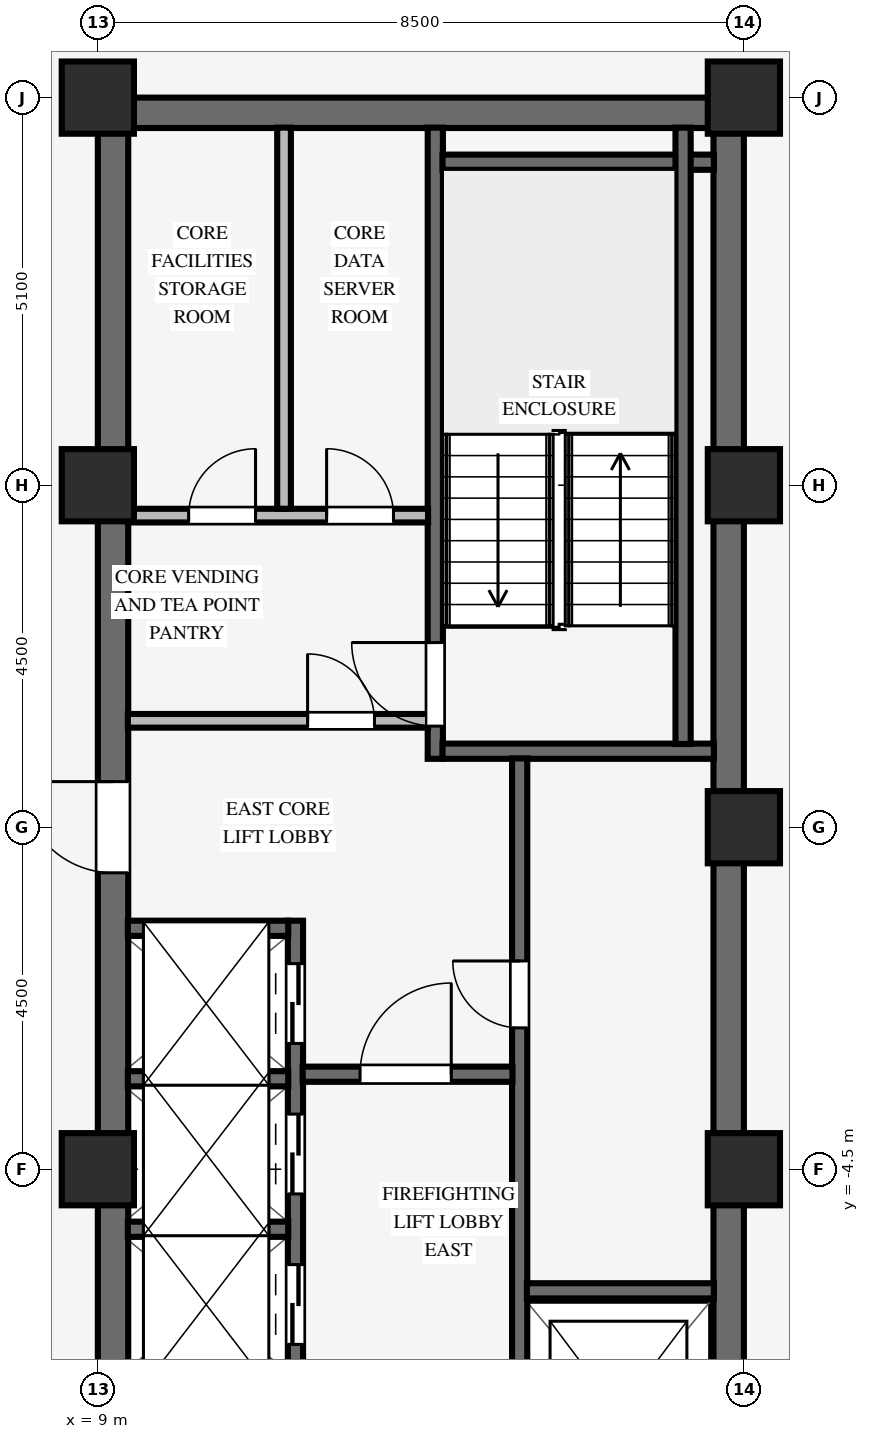
"""IFC4 building model, lengths in metres.
Left out: names, types, materials, properties, quantities, classifications, styles, units other than length and angle.
Written with IfcOpenShell. Run it as: python <this file> out.ifc"""

import sys

from ifc_helpers import new_model, si_unit, direction, frame, frame_2d, origin, origin_2d, place, context, subcontext, project, spatial, rectangle, extrude, source, transform, mapped, element, fill, save


model = new_model("IFC4")
c1 = context("Model", 3, precision=1e-05, world=origin(), true_north=direction((0.0, 1.0)))
c2 = subcontext(c1, "Body", "Model", "MODEL_VIEW")
j1 = project(units=[si_unit("LENGTHUNIT", "METRE"), si_unit("PLANEANGLEUNIT", "RADIAN")], contexts=[c1])
p1 = place(None, origin())
s1 = spatial("IfcSite", under=j1, at=p1, CompositionType="ELEMENT")
p2 = place(p1, origin())
s2 = spatial("IfcBuilding", under=s1, at=p2, CompositionType="ELEMENT")
p3 = place(p2, frame((0.0, 0.0, 156.7)))
s3 = spatial("IfcBuildingStorey", under=s2, at=p3, CompositionType="ELEMENT", Elevation=156.7)
p4 = place(p3, frame((9.0, 9.4, 0.0), z_axis=(0.0, 0.0, 1.0), x_axis=(1.0, 0.0, 0.0)))
e1 = element("IfcWall", 1, at=p4, inside=s3, PredefinedType="SHEAR", context=c2, shape_type="SweptSolid", body=[
    extrude(rectangle(XDim=8.5, YDim=0.4, at=frame_2d((4.25, 0.0))), origin(), (0.0, 0.0, 1.0), 3.37),
])
p5 = place(p3, frame((9.2, -9.205, 0.0), z_axis=(0.0, 0.0, 1.0), x_axis=(0.0, 1.0, 0.0)))
e2 = element("IfcWall", 2, at=p5, inside=s3, PredefinedType="SHEAR", context=c2, shape_type="SweptSolid", body=[
    extrude(rectangle(XDim=18.41, YDim=0.4, at=frame_2d((9.205, 0.0))), origin(), (0.0, 0.0, 1.0), 3.37),
])
p6 = place(p5, frame((8.605, 0.0, 0.0)))
e3 = element("IfcOpeningElement", 3, at=p6, cuts=e2, PredefinedType="OPENING", context=c2, shape_type="SweptSolid", body=[
    extrude(rectangle(XDim=1.2, YDim=2.15, at=frame_2d((0.6, 1.075))), frame((0.0, 0.21, 0.0), z_axis=(0.0, -1.0, 0.0), x_axis=(1.0, 0.0, 0.0)), (0.0, 0.0, 1.0), 0.42),
])
p7 = place(p3, frame((17.3, -9.205, 0.0), z_axis=(0.0, 0.0, 1.0), x_axis=(0.0, 1.0, 0.0)))
e4 = element("IfcWall", 4, at=p7, inside=s3, PredefinedType="SHEAR", context=c2, shape_type="SweptSolid", body=[
    extrude(rectangle(XDim=18.41, YDim=0.4, at=frame_2d((9.205, 0.0))), origin(), (0.0, 0.0, 1.0), 3.37),
])
for number, where, z_axis, x_axis in (
    (5, (9.0, -4.5, 0.0), (0.0, 0.0, 1.0), (1.0, 0.0, 0.0)),
    (6, (9.0, 4.5, 0.0), (0.0, 0.0, 1.0), (1.0, 0.0, 0.0)),
    (7, (9.0, 9.6, 0.0), (0.0, 0.0, 1.0), (1.0, 0.0, 0.0)),
    (8, (17.5, -4.5, 0.0), (0.0, 0.0, 1.0), (1.0, 0.0, 0.0)),
    (9, (17.5, 4.5, 0.0), (0.0, 0.0, 1.0), (1.0, 0.0, 0.0)),
    (10, (17.5, 9.6, 0.0), (0.0, 0.0, 1.0), (1.0, 0.0, 0.0)),
    (11, (17.5, 0.0, 0.0), (0.0, 0.0, 1.0), (1.0, 0.0, 0.0)),
):
    element("IfcColumn", number, at=place(p3, frame(where, z_axis=z_axis, x_axis=x_axis)), inside=s3, PredefinedType="COLUMN", context=c2, shape_type="SweptSolid", body=[
        extrude(rectangle(XDim=0.95, YDim=0.95, at=origin_2d()), origin(), (0.0, 0.0, 1.0), 3.37),
    ])
p8 = place(p3, frame((13.44, 0.9, 0.0), z_axis=(0.0, 0.0, 1.0), x_axis=(0.0, 1.0, 0.0)))
e12 = element("IfcWall", 12, at=p8, inside=s3, PredefinedType="SHEAR", context=c2, shape_type="SweptSolid", body=[
    extrude(rectangle(XDim=8.305, YDim=0.2, at=frame_2d((4.153, 0.0))), origin(), (0.0, 0.0, 1.0), 3.37),
])
p9 = place(p8, frame((0.43, 0.0, 0.0)))
e13 = element("IfcOpeningElement", 13, at=p9, cuts=e12, PredefinedType="OPENING", context=c2, shape_type="SweptSolid", body=[
    extrude(rectangle(XDim=1.1, YDim=2.15, at=frame_2d((0.55, 1.075))), frame((0.0, 0.11, 0.0), z_axis=(0.0, -1.0, 0.0), x_axis=(1.0, 0.0, 0.0)), (0.0, 0.0, 1.0), 0.22),
])
for number, where, z_axis, x_axis in (
    (14, (13.535, 1.0, 0.0), (0.0, 0.0, 1.0), (1.0, 0.0, 0.0)),
    (15, (13.535, 8.75, 0.0), (0.0, 0.0, 1.0), (1.0, 0.0, 0.0)),
):
    element("IfcWall", number, at=place(p3, frame(where, z_axis=z_axis, x_axis=x_axis)), inside=s3, PredefinedType="SHEAR", context=c2, shape_type="SweptSolid", body=[
        extrude(rectangle(XDim=3.57, YDim=0.2, at=frame_2d((1.785, 0.0))), origin(), (0.0, 0.0, 1.0), 3.37),
    ])
p10 = place(p3, frame((16.7, 1.095, 0.0), z_axis=(0.0, 0.0, 1.0), x_axis=(0.0, 1.0, 0.0)))
e16 = element("IfcWall", 16, at=p10, inside=s3, PredefinedType="SHEAR", context=c2, shape_type="SweptSolid", body=[
    extrude(rectangle(XDim=8.11, YDim=0.2, at=frame_2d((4.055, 0.0))), origin(), (0.0, 0.0, 1.0), 3.37),
])
p11 = place(p3, frame((14.55, -9.205, 0.0), z_axis=(0.0, 0.0, 1.0), x_axis=(0.0, 1.0, 0.0)))
e17 = element("IfcWall", 17, at=p11, inside=s3, PredefinedType="SHEAR", context=c2, shape_type="SweptSolid", body=[
    extrude(rectangle(XDim=10.11, YDim=0.2, at=frame_2d((5.055, 0.0))), origin(), (0.0, 0.0, 1.0), 3.37),
])
p12 = place(p11, frame((6.565, 0.0, 0.0)))
e18 = element("IfcOpeningElement", 18, at=p12, cuts=e17, PredefinedType="OPENING", context=c2, shape_type="SweptSolid", body=[
    extrude(rectangle(XDim=0.88, YDim=2.1, at=frame_2d((0.44, 1.05))), frame((0.0, 0.11, 0.0), z_axis=(0.0, -1.0, 0.0), x_axis=(1.0, 0.0, 0.0)), (0.0, 0.0, 1.0), 0.22),
])
p13 = place(p11, frame((0.93, 0.0, 0.0)))
e19 = element("IfcOpeningElement", 19, at=p13, cuts=e17, PredefinedType="OPENING", context=c2, shape_type="SweptSolid", body=[
    extrude(rectangle(XDim=1.15, YDim=2.15, at=frame_2d((0.575, 1.075))), frame((0.0, 0.11, 0.0), z_axis=(0.0, -1.0, 0.0), x_axis=(1.0, 0.0, 0.0)), (0.0, 0.0, 1.0), 0.22),
])
p14 = place(p3, frame((14.645, -6.1, 0.0), z_axis=(0.0, 0.0, 1.0), x_axis=(1.0, 0.0, 0.0)))
e20 = element("IfcWall", 20, at=p14, inside=s3, PredefinedType="SHEAR", context=c2, shape_type="SweptSolid", body=[
    extrude(rectangle(XDim=2.46, YDim=0.2, at=frame_2d((1.23, 0.0))), origin(), (0.0, 0.0, 1.0), 3.37),
])
p15 = place(p3, frame((11.6, -9.205, 0.0), z_axis=(0.0, 0.0, 1.0), x_axis=(0.0, 1.0, 0.0)))
e21 = element("IfcWall", 21, at=p15, inside=s3, PredefinedType="SHEAR", context=c2, shape_type="SweptSolid", body=[
    extrude(rectangle(XDim=7.975, YDim=0.2, at=frame_2d((3.988, 0.0))), origin(), (0.0, 0.0, 1.0), 3.37),
])
p16 = place(p15, frame((0.42, 0.0, 0.0)))
e22 = element("IfcOpeningElement", 22, at=p16, cuts=e21, PredefinedType="OPENING", context=c2, shape_type="SweptSolid", body=[
    extrude(rectangle(XDim=1.05, YDim=2.15, at=frame_2d((0.525, 1.075))), frame((0.0, 0.11, 0.0), z_axis=(0.0, -1.0, 0.0), x_axis=(1.0, 0.0, 0.0)), (0.0, 0.0, 1.0), 0.22),
])
p17 = place(p15, frame((2.4, 0.0, 0.0)))
e23 = element("IfcOpeningElement", 23, at=p17, cuts=e21, PredefinedType="OPENING", context=c2, shape_type="SweptSolid", body=[
    extrude(rectangle(XDim=1.05, YDim=2.15, at=frame_2d((0.525, 1.075))), frame((0.0, 0.11, 0.0), z_axis=(0.0, -1.0, 0.0), x_axis=(1.0, 0.0, 0.0)), (0.0, 0.0, 1.0), 0.22),
])
p18 = place(p15, frame((4.38, 0.0, 0.0)))
e24 = element("IfcOpeningElement", 24, at=p18, cuts=e21, PredefinedType="OPENING", context=c2, shape_type="SweptSolid", body=[
    extrude(rectangle(XDim=1.05, YDim=2.15, at=frame_2d((0.525, 1.075))), frame((0.0, 0.11, 0.0), z_axis=(0.0, -1.0, 0.0), x_axis=(1.0, 0.0, 0.0)), (0.0, 0.0, 1.0), 0.22),
])
p19 = place(p15, frame((6.36, 0.0, 0.0)))
e25 = element("IfcOpeningElement", 25, at=p19, cuts=e21, PredefinedType="OPENING", context=c2, shape_type="SweptSolid", body=[
    extrude(rectangle(XDim=1.05, YDim=2.15, at=frame_2d((0.525, 1.075))), frame((0.0, 0.11, 0.0), z_axis=(0.0, -1.0, 0.0), x_axis=(1.0, 0.0, 0.0)), (0.0, 0.0, 1.0), 0.22),
])
p20 = place(p3, frame((11.695, -3.25, 0.0), z_axis=(0.0, 0.0, 1.0), x_axis=(1.0, 0.0, 0.0)))
e26 = element("IfcWall", 26, at=p20, inside=s3, PredefinedType="SHEAR", context=c2, shape_type="SweptSolid", body=[
    extrude(rectangle(XDim=2.76, YDim=0.2, at=frame_2d((1.38, 0.0))), origin(), (0.0, 0.0, 1.0), 3.37),
])
p21 = place(p20, frame((0.755, 0.0, 0.0)))
e27 = element("IfcOpeningElement", 27, at=p21, cuts=e26, PredefinedType="OPENING", context=c2, shape_type="SweptSolid", body=[
    extrude(rectangle(XDim=1.2, YDim=2.15, at=frame_2d((0.6, 1.075))), frame((0.0, 0.11, 0.0), z_axis=(0.0, -1.0, 0.0), x_axis=(1.0, 0.0, 0.0)), (0.0, 0.0, 1.0), 0.22),
])
for number, where, z_axis, x_axis in (
    (28, (9.395, -5.29, 0.0), (0.0, 0.0, 1.0), (1.0, 0.0, 0.0)),
    (29, (9.395, -3.31, 0.0), (0.0, 0.0, 1.0), (1.0, 0.0, 0.0)),
    (30, (9.395, -1.33, 0.0), (0.0, 0.0, 1.0), (1.0, 0.0, 0.0)),
):
    element("IfcWall", number, at=place(p3, frame(where, z_axis=z_axis, x_axis=x_axis)), inside=s3, PredefinedType="SHEAR", context=c2, shape_type="SweptSolid", body=[
        extrude(rectangle(XDim=2.11, YDim=0.2, at=frame_2d((1.055, 0.0))), origin(), (0.0, 0.0, 1.0), 3.37),
    ])
p22 = place(p3, frame((9.395, 1.4, 0.0), z_axis=(0.0, 0.0, 1.0), x_axis=(1.0, 0.0, 0.0)))
e31 = element("IfcWall", 31, at=p22, inside=s3, PredefinedType="PARTITIONING", context=c2, shape_type="SweptSolid", body=[
    extrude(rectangle(XDim=3.95, YDim=0.18, at=frame_2d((1.975, 0.0))), origin(), (0.0, 0.0, 1.0), 3.36),
])
p23 = place(p22, frame((2.365, 0.0, 0.0)))
e32 = element("IfcOpeningElement", 32, at=p23, cuts=e31, PredefinedType="OPENING", context=c2, shape_type="SweptSolid", body=[
    extrude(rectangle(XDim=0.88, YDim=2.1, at=frame_2d((0.44, 1.05))), frame((0.0, 0.1, 0.0), z_axis=(0.0, -1.0, 0.0), x_axis=(1.0, 0.0, 0.0)), (0.0, 0.0, 1.0), 0.2),
])
p24 = place(p3, frame((9.395, 4.1, 0.0), z_axis=(0.0, 0.0, 1.0), x_axis=(1.0, 0.0, 0.0)))
e33 = element("IfcWall", 33, at=p24, inside=s3, PredefinedType="PARTITIONING", context=c2, shape_type="SweptSolid", body=[
    extrude(rectangle(XDim=3.95, YDim=0.18, at=frame_2d((1.975, 0.0))), origin(), (0.0, 0.0, 1.0), 3.36),
])
p25 = place(p24, frame((0.8, 0.0, 0.0)))
e34 = element("IfcOpeningElement", 34, at=p25, cuts=e33, PredefinedType="OPENING", context=c2, shape_type="SweptSolid", body=[
    extrude(rectangle(XDim=0.88, YDim=2.1, at=frame_2d((0.44, 1.05))), frame((0.0, 0.1, 0.0), z_axis=(0.0, -1.0, 0.0), x_axis=(1.0, 0.0, 0.0)), (0.0, 0.0, 1.0), 0.2),
])
p26 = place(p24, frame((2.615, 0.0, 0.0)))
e35 = element("IfcOpeningElement", 35, at=p26, cuts=e33, PredefinedType="OPENING", context=c2, shape_type="SweptSolid", body=[
    extrude(rectangle(XDim=0.88, YDim=2.1, at=frame_2d((0.44, 1.05))), frame((0.0, 0.1, 0.0), z_axis=(0.0, -1.0, 0.0), x_axis=(1.0, 0.0, 0.0)), (0.0, 0.0, 1.0), 0.2),
])
p27 = place(p3, frame((11.45, 4.19, 0.0), z_axis=(0.0, 0.0, 1.0), x_axis=(0.0, 1.0, 0.0)))
e36 = element("IfcWall", 36, at=p27, inside=s3, PredefinedType="PARTITIONING", context=c2, shape_type="SweptSolid", body=[
    extrude(rectangle(XDim=5.015, YDim=0.18, at=frame_2d((2.508, 0.0))), origin(), (0.0, 0.0, 1.0), 3.36),
])
m1 = source(origin(), c2, "Body", "SweptSolid", [
    extrude(rectangle(XDim=1.1, YDim=2.15, at=frame_2d((0.55, 1.075))), frame((0.0, 0.025, 0.0), z_axis=(0.0, -1.0, 0.0), x_axis=(1.0, 0.0, 0.0)), (0.0, 0.0, 1.0), 0.05),
])
p28 = place(p9, origin())
e37 = element("IfcDoor", 37, at=p28, inside=s3, OperationType="SINGLE_SWING_RIGHT", PredefinedType="DOOR", context=c2, shape_type="MappedRepresentation", body=[
    mapped(m1, transform((0.0, 0.0, 0.0), scale=1.0)),
])
fill(e13, e37)
m2 = source(origin(), c2, "Body", "SweptSolid", [
    extrude(rectangle(XDim=0.88, YDim=2.1, at=frame_2d((0.44, 1.05))), frame((0.0, 0.025, 0.0), z_axis=(0.0, -1.0, 0.0), x_axis=(1.0, 0.0, 0.0)), (0.0, 0.0, 1.0), 0.05),
])
p29 = place(p12, origin())
e38 = element("IfcDoor", 38, at=p29, inside=s3, OperationType="SINGLE_SWING_RIGHT", PredefinedType="DOOR", context=c2, shape_type="MappedRepresentation", body=[
    mapped(m2, transform((0.0, 0.0, 0.0), scale=1.0)),
])
fill(e18, e38)
m3 = source(origin(), c2, "Body", "SweptSolid", [
    extrude(rectangle(XDim=1.2, YDim=2.15, at=frame_2d((0.6, 1.075))), frame((0.0, 0.025, 0.0), z_axis=(0.0, -1.0, 0.0), x_axis=(1.0, 0.0, 0.0)), (0.0, 0.0, 1.0), 0.05),
])
p30 = place(p21, origin())
e39 = element("IfcDoor", 39, at=p30, inside=s3, OperationType="SINGLE_SWING_RIGHT", PredefinedType="DOOR", context=c2, shape_type="MappedRepresentation", body=[
    mapped(m3, transform((0.0, 0.0, 0.0), scale=1.0)),
])
fill(e27, e39)
p31 = place(p6, origin())
e40 = element("IfcDoor", 40, at=p31, inside=s3, OperationType="SINGLE_SWING_RIGHT", PredefinedType="DOOR", context=c2, shape_type="MappedRepresentation", body=[
    mapped(m3, transform((0.0, 0.0, 0.0), scale=1.0)),
])
fill(e3, e40)
p32 = place(p23, origin())
e41 = element("IfcDoor", 41, at=p32, inside=s3, OperationType="SINGLE_SWING_LEFT", PredefinedType="DOOR", context=c2, shape_type="MappedRepresentation", body=[
    mapped(m2, transform((0.0, 0.0, 0.0), scale=1.0)),
])
fill(e32, e41)
p33 = place(p25, origin())
e42 = element("IfcDoor", 42, at=p33, inside=s3, OperationType="SINGLE_SWING_RIGHT", PredefinedType="DOOR", context=c2, shape_type="MappedRepresentation", body=[
    mapped(m2, transform((0.0, 0.0, 0.0), scale=1.0)),
])
fill(e34, e42)
p34 = place(p26, origin())
e43 = element("IfcDoor", 43, at=p34, inside=s3, OperationType="SINGLE_SWING_LEFT", PredefinedType="DOOR", context=c2, shape_type="MappedRepresentation", body=[
    mapped(m2, transform((0.0, 0.0, 0.0), scale=1.0)),
])
fill(e35, e43)
m4 = source(origin(), c2, "Body", "SweptSolid", [
    extrude(rectangle(XDim=1.05, YDim=2.15, at=frame_2d((0.525, 1.075))), frame((0.0, 0.025, 0.0), z_axis=(0.0, -1.0, 0.0), x_axis=(1.0, 0.0, 0.0)), (0.0, 0.0, 1.0), 0.05),
])
p35 = place(p17, origin())
e44 = element("IfcDoor", 44, at=p35, inside=s3, OperationType="DOUBLE_DOOR_SLIDING", PredefinedType="DOOR", context=c2, shape_type="MappedRepresentation", body=[
    mapped(m4, transform((0.0, 0.0, 0.0), scale=1.0)),
])
fill(e23, e44)
p36 = place(p18, origin())
e45 = element("IfcDoor", 45, at=p36, inside=s3, OperationType="DOUBLE_DOOR_SLIDING", PredefinedType="DOOR", context=c2, shape_type="MappedRepresentation", body=[
    mapped(m4, transform((0.0, 0.0, 0.0), scale=1.0)),
])
fill(e24, e45)
p37 = place(p19, origin())
e46 = element("IfcDoor", 46, at=p37, inside=s3, OperationType="DOUBLE_DOOR_SLIDING", PredefinedType="DOOR", context=c2, shape_type="MappedRepresentation", body=[
    mapped(m4, transform((0.0, 0.0, 0.0), scale=1.0)),
])
fill(e25, e46)
save(model, sys.argv[1])
